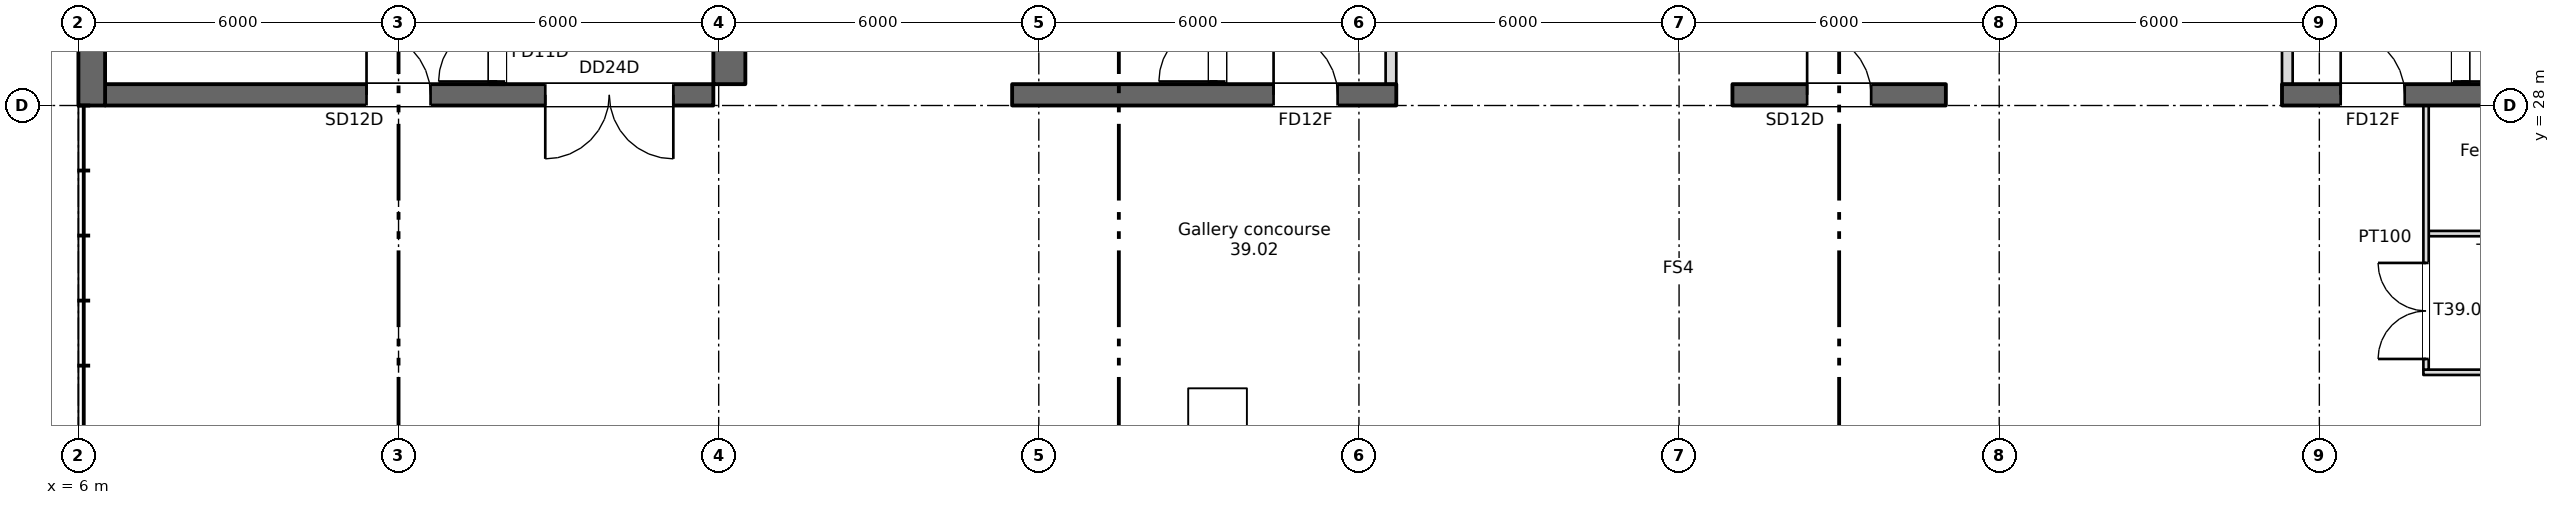
"""IFC4 building model, lengths in metres.
Left out: names, types, materials, properties, quantities, classifications, styles, units other than length and angle.
Written with IfcOpenShell. Run it as: python <this file> out.ifc"""

import sys

from ifc_helpers import new_model, si_unit, direction, frame, frame_2d, origin, place, context, subcontext, project, spatial, rectangle, extrude, element, fill, save


model = new_model("IFC4")
c1 = context("Model", 3, precision=1e-05, world=origin(), true_north=direction((0.0, 1.0)))
c2 = subcontext(c1, "Body", "Model", "MODEL_VIEW")
j1 = project(units=[si_unit("LENGTHUNIT", "METRE"), si_unit("PLANEANGLEUNIT", "RADIAN")], contexts=[c1])
p1 = place(None, origin())
s1 = spatial("IfcSite", under=j1, at=p1, CompositionType="ELEMENT")
p2 = place(p1, origin())
s2 = spatial("IfcBuilding", under=s1, at=p2, CompositionType="ELEMENT")
p3 = place(p2, frame((0.0, 0.0, 265.95)))
s3 = spatial("IfcBuildingStorey", under=s2, at=p3, CompositionType="ELEMENT", Elevation=265.95)
p4 = place(p3, frame((6.25, 28.0, 0.0), z_axis=(0.0, 0.0, 1.0), x_axis=(0.0, 1.0, 0.0)))
e1 = element("IfcWall", 1, at=p4, inside=s3, PredefinedType="SHEAR", context=c2, shape_type="SweptSolid", body=[
    extrude(rectangle(XDim=13.5, YDim=0.5, at=frame_2d((6.75, 0.0))), origin(), (0.0, 0.0, 1.0), 5.4),
])
p5 = place(p3, frame((10.15, 28.4, 0.0), z_axis=(0.0, 0.0, 1.0), x_axis=(0.0, 1.0, 0.0)))
e2 = element("IfcWall", 2, at=p5, inside=s3, PredefinedType="SHEAR", context=c2, shape_type="SweptSolid", body=[
    extrude(rectangle(XDim=6.1, YDim=0.3, at=frame_2d((3.05, 0.0))), origin(), (0.0, 0.0, 1.0), 5.4),
])
p6 = place(p3, frame((13.85, 28.4, 0.0), z_axis=(0.0, 0.0, 1.0), x_axis=(0.0, 1.0, 0.0)))
e3 = element("IfcWall", 3, at=p6, inside=s3, PredefinedType="SHEAR", context=c2, shape_type="SweptSolid", body=[
    extrude(rectangle(XDim=6.1, YDim=0.3, at=frame_2d((3.05, 0.0))), origin(), (0.0, 0.0, 1.0), 5.4),
])
p7 = place(p6, frame((0.05, 0.0, 0.0)))
e4 = element("IfcOpeningElement", 4, at=p7, cuts=e3, PredefinedType="OPENING", context=c2, shape_type="SweptSolid", body=[
    extrude(rectangle(XDim=1.1, YDim=2.1, at=frame_2d((0.55, 1.05))), frame((0.0, 0.16, 0.0), z_axis=(0.0, -1.0, 0.0), x_axis=(1.0, 0.0, 0.0)), (0.0, 0.0, 1.0), 0.32),
])
p8 = place(p3, frame((23.65, 28.4, 0.0), z_axis=(0.0, 0.0, 1.0), x_axis=(0.0, 1.0, 0.0)))
e5 = element("IfcWall", 5, at=p8, inside=s3, PredefinedType="SHEAR", context=c2, shape_type="SweptSolid", body=[
    extrude(rectangle(XDim=6.1, YDim=0.3, at=frame_2d((3.05, 0.0))), origin(), (0.0, 0.0, 1.0), 5.4),
])
p9 = place(p3, frame((27.35, 28.4, 0.0), z_axis=(0.0, 0.0, 1.0), x_axis=(0.0, 1.0, 0.0)))
e6 = element("IfcWall", 6, at=p9, inside=s3, PredefinedType="SHEAR", context=c2, shape_type="SweptSolid", body=[
    extrude(rectangle(XDim=6.1, YDim=0.3, at=frame_2d((3.05, 0.0))), origin(), (0.0, 0.0, 1.0), 5.4),
])
p10 = place(p9, frame((0.05, 0.0, 0.0)))
e7 = element("IfcOpeningElement", 7, at=p10, cuts=e6, PredefinedType="OPENING", context=c2, shape_type="SweptSolid", body=[
    extrude(rectangle(XDim=1.1, YDim=2.1, at=frame_2d((0.55, 1.05))), frame((0.0, 0.16, 0.0), z_axis=(0.0, -1.0, 0.0), x_axis=(1.0, 0.0, 0.0)), (0.0, 0.0, 1.0), 0.32),
])
p11 = place(p3, frame((23.5, 28.2, 0.0), z_axis=(0.0, 0.0, 1.0), x_axis=(1.0, 0.0, 0.0)))
e8 = element("IfcWall", 8, at=p11, inside=s3, PredefinedType="SHEAR", context=c2, shape_type="SweptSolid", body=[
    extrude(rectangle(XDim=7.2, YDim=0.4, at=frame_2d((3.6, 0.0))), origin(), (0.0, 0.0, 1.0), 5.4),
])
p12 = place(p11, frame((4.9, 0.0, 0.0)))
e9 = element("IfcOpeningElement", 9, at=p12, cuts=e8, PredefinedType="OPENING", context=c2, shape_type="SweptSolid", body=[
    extrude(rectangle(XDim=1.2, YDim=2.1, at=frame_2d((0.6, 1.05))), frame((0.0, 0.21, 0.0), z_axis=(0.0, -1.0, 0.0), x_axis=(1.0, 0.0, 0.0)), (0.0, 0.0, 1.0), 0.42),
])
for number, where, z_axis, x_axis in (
    (10, (37.15, 28.4, 0.0), (0.0, 0.0, 1.0), (0.0, 1.0, 0.0)),
    (11, (40.85, 28.4, 0.0), (0.0, 0.0, 1.0), (0.0, 1.0, 0.0)),
):
    element("IfcWall", number, at=place(p3, frame(where, z_axis=z_axis, x_axis=x_axis)), inside=s3, PredefinedType="SHEAR", context=c2, shape_type="SweptSolid", body=[
        extrude(rectangle(XDim=6.1, YDim=0.3, at=frame_2d((3.05, 0.0))), origin(), (0.0, 0.0, 1.0), 5.4),
    ])
p13 = place(p3, frame((37.0, 28.2, 0.0), z_axis=(0.0, 0.0, 1.0), x_axis=(1.0, 0.0, 0.0)))
e12 = element("IfcWall", 12, at=p13, inside=s3, PredefinedType="SHEAR", context=c2, shape_type="SweptSolid", body=[
    extrude(rectangle(XDim=4.0, YDim=0.4, at=frame_2d((2.0, 0.0))), origin(), (0.0, 0.0, 1.0), 5.4),
])
p14 = place(p13, frame((1.4, 0.0, 0.0)))
e13 = element("IfcOpeningElement", 13, at=p14, cuts=e12, PredefinedType="OPENING", context=c2, shape_type="SweptSolid", body=[
    extrude(rectangle(XDim=1.2, YDim=2.1, at=frame_2d((0.6, 1.05))), frame((0.0, 0.21, 0.0), z_axis=(0.0, -1.0, 0.0), x_axis=(1.0, 0.0, 0.0)), (0.0, 0.0, 1.0), 0.42),
])
p15 = place(p3, frame((50.65, 34.5, 0.0), z_axis=(0.0, 0.0, 1.0), x_axis=(0.0, -1.0, 0.0)))
e14 = element("IfcWall", 14, at=p15, inside=s3, PredefinedType="SHEAR", context=c2, shape_type="SweptSolid", body=[
    extrude(rectangle(XDim=6.1, YDim=0.3, at=frame_2d((3.05, 0.0))), origin(), (0.0, 0.0, 1.0), 5.4),
])
p16 = place(p15, frame((4.95, 0.0, 0.0)))
e15 = element("IfcOpeningElement", 15, at=p16, cuts=e14, PredefinedType="OPENING", context=c2, shape_type="SweptSolid", body=[
    extrude(rectangle(XDim=1.1, YDim=2.1, at=frame_2d((0.55, 1.05))), frame((0.0, 0.16, 0.0), z_axis=(0.0, -1.0, 0.0), x_axis=(1.0, 0.0, 0.0)), (0.0, 0.0, 1.0), 0.32),
])
p17 = place(p3, frame((47.3, 28.2, 0.0), z_axis=(0.0, 0.0, 1.0), x_axis=(1.0, 0.0, 0.0)))
e16 = element("IfcWall", 16, at=p17, inside=s3, PredefinedType="SHEAR", context=c2, shape_type="SweptSolid", body=[
    extrude(rectangle(XDim=7.2, YDim=0.4, at=frame_2d((3.6, 0.0))), origin(), (0.0, 0.0, 1.0), 5.4),
])
p18 = place(p17, frame((1.1, 0.0, 0.0)))
e17 = element("IfcOpeningElement", 17, at=p18, cuts=e16, PredefinedType="OPENING", context=c2, shape_type="SweptSolid", body=[
    extrude(rectangle(XDim=1.2, YDim=2.1, at=frame_2d((0.6, 1.05))), frame((0.0, 0.21, 0.0), z_axis=(0.0, -1.0, 0.0), x_axis=(1.0, 0.0, 0.0)), (0.0, 0.0, 1.0), 0.42),
])
for number, where, z_axis, x_axis in (
    (18, (30.6, 28.4, 0.0), (0.0, 0.0, 1.0), (0.0, 1.0, 0.0)),
    (19, (47.4, 28.4, 0.0), (0.0, 0.0, 1.0), (0.0, 1.0, 0.0)),
):
    element("IfcWall", number, at=place(p3, frame(where, z_axis=z_axis, x_axis=x_axis)), inside=s3, PredefinedType="PARTITIONING", context=c2, shape_type="SweptSolid", body=[
        extrude(rectangle(XDim=6.1, YDim=0.2, at=frame_2d((3.05, 0.0))), origin(), (0.0, 0.0, 1.0), 5.4),
    ])
p19 = place(p3, frame((6.5, 28.2, 0.0), z_axis=(0.0, 0.0, 1.0), x_axis=(1.0, 0.0, 0.0)))
e20 = element("IfcWall", 20, at=p19, inside=s3, PredefinedType="SHEAR", context=c2, shape_type="SweptSolid", body=[
    extrude(rectangle(XDim=11.4, YDim=0.4, at=frame_2d((5.7, 0.0))), origin(), (0.0, 0.0, 1.0), 5.4),
])
p20 = place(p19, frame((4.9, 0.0, 0.0)))
e21 = element("IfcOpeningElement", 21, at=p20, cuts=e20, PredefinedType="OPENING", context=c2, shape_type="SweptSolid", body=[
    extrude(rectangle(XDim=1.2, YDim=2.1, at=frame_2d((0.6, 1.05))), frame((0.0, 0.21, 0.0), z_axis=(0.0, -1.0, 0.0), x_axis=(1.0, 0.0, 0.0)), (0.0, 0.0, 1.0), 0.42),
])
p21 = place(p19, frame((8.25, 0.0, 0.0)))
e22 = element("IfcOpeningElement", 22, at=p21, cuts=e20, PredefinedType="OPENING", context=c2, shape_type="SweptSolid", body=[
    extrude(rectangle(XDim=2.4, YDim=2.1, at=frame_2d((1.2, 1.05))), frame((0.0, 0.21, 0.0), z_axis=(0.0, -1.0, 0.0), x_axis=(1.0, 0.0, 0.0)), (0.0, 0.0, 1.0), 0.42),
])
p22 = place(p3, frame((6.75, 28.4, 0.0), z_axis=(0.0, 0.0, 1.0), x_axis=(0.0, 1.0, 0.0)))
e23 = element("IfcWall", 23, at=p22, inside=s3, PredefinedType="SHEAR", context=c2, shape_type="SweptSolid", body=[
    extrude(rectangle(XDim=12.3, YDim=0.5, at=frame_2d((6.15, 0.0))), origin(), (0.0, 0.0, 1.0), 5.4),
])
p23 = place(p3, frame((18.2, 40.7, 0.0), z_axis=(0.0, 0.0, 1.0), x_axis=(0.0, -1.0, 0.0)))
e24 = element("IfcWall", 24, at=p23, inside=s3, PredefinedType="SHEAR", context=c2, shape_type="SweptSolid", body=[
    extrude(rectangle(XDim=12.3, YDim=0.6, at=frame_2d((6.15, 0.0))), origin(), (0.0, 0.0, 1.0), 5.4),
])
p24 = place(p23, frame((0.7, 0.0, 0.0)))
e25 = element("IfcOpeningElement", 25, at=p24, cuts=e24, PredefinedType="OPENING", context=c2, shape_type="SweptSolid", body=[
    extrude(rectangle(XDim=2.0, YDim=2.1, at=frame_2d((1.0, 1.05))), frame((0.0, 0.31, 0.0), z_axis=(0.0, -1.0, 0.0), x_axis=(1.0, 0.0, 0.0)), (0.0, 0.0, 1.0), 0.62),
])
p25 = place(p3, frame((49.95, 23.0, 0.0), z_axis=(0.0, 0.0, 1.0), x_axis=(1.0, 0.0, 0.0)))
e26 = element("IfcWall", 26, at=p25, inside=s3, PredefinedType="PARTITIONING", context=c2, shape_type="SweptSolid", body=[
    extrude(rectangle(XDim=8.75, YDim=0.1, at=frame_2d((4.375, 0.0))), origin(), (0.0, 0.0, 1.0), 5.4),
])
p26 = place(p3, frame((50.05, 25.6, 0.0), z_axis=(0.0, 0.0, 1.0), x_axis=(1.0, 0.0, 0.0)))
e27 = element("IfcWall", 27, at=p26, inside=s3, PredefinedType="PARTITIONING", context=c2, shape_type="SweptSolid", body=[
    extrude(rectangle(XDim=10.7, YDim=0.1, at=frame_2d((5.35, 0.0))), origin(), (0.0, 0.0, 1.0), 5.4),
])
p27 = place(p26, frame((1.05, 0.0, 0.0)))
e28 = element("IfcOpeningElement", 28, at=p27, cuts=e27, PredefinedType="OPENING", context=c2, shape_type="SweptSolid", body=[
    extrude(rectangle(XDim=1.0, YDim=2.1, at=frame_2d((0.5, 1.05))), frame((0.0, 0.06, 0.0), z_axis=(0.0, -1.0, 0.0), x_axis=(1.0, 0.0, 0.0)), (0.0, 0.0, 1.0), 0.12),
])
p28 = place(p26, frame((4.25, 0.0, 0.0)))
e29 = element("IfcOpeningElement", 29, at=p28, cuts=e27, PredefinedType="OPENING", context=c2, shape_type="SweptSolid", body=[
    extrude(rectangle(XDim=1.0, YDim=2.1, at=frame_2d((0.5, 1.05))), frame((0.0, 0.06, 0.0), z_axis=(0.0, -1.0, 0.0), x_axis=(1.0, 0.0, 0.0)), (0.0, 0.0, 1.0), 0.12),
])
p29 = place(p26, frame((6.95, 0.0, 0.0)))
e30 = element("IfcOpeningElement", 30, at=p29, cuts=e27, PredefinedType="OPENING", context=c2, shape_type="SweptSolid", body=[
    extrude(rectangle(XDim=1.0, YDim=2.1, at=frame_2d((0.5, 1.05))), frame((0.0, 0.06, 0.0), z_axis=(0.0, -1.0, 0.0), x_axis=(1.0, 0.0, 0.0)), (0.0, 0.0, 1.0), 0.12),
])
p30 = place(p3, frame((50.0, 23.05, 0.0), z_axis=(0.0, 0.0, 1.0), x_axis=(0.0, 1.0, 0.0)))
e31 = element("IfcWall", 31, at=p30, inside=s3, PredefinedType="PARTITIONING", context=c2, shape_type="SweptSolid", body=[
    extrude(rectangle(XDim=4.95, YDim=0.1, at=frame_2d((2.475, 0.0))), origin(), (0.0, 0.0, 1.0), 5.4),
])
p31 = place(p30, frame((0.2, 0.0, 0.0)))
e32 = element("IfcOpeningElement", 32, at=p31, cuts=e31, PredefinedType="OPENING", context=c2, shape_type="SweptSolid", body=[
    extrude(rectangle(XDim=1.8, YDim=2.1, at=frame_2d((0.9, 1.05))), frame((0.0, 0.06, 0.0), z_axis=(0.0, -1.0, 0.0), x_axis=(1.0, 0.0, 0.0)), (0.0, 0.0, 1.0), 0.12),
])
p32 = place(p20, origin())
e33 = element("IfcDoor", 33, at=p32, inside=s3, OperationType="SINGLE_SWING_LEFT", PredefinedType="DOOR", context=c2, shape_type="SweptSolid", body=[
    extrude(rectangle(XDim=1.2, YDim=2.1, at=frame_2d((0.6, 1.05))), frame((0.0, 0.025, 0.0), z_axis=(0.0, -1.0, 0.0), x_axis=(1.0, 0.0, 0.0)), (0.0, 0.0, 1.0), 0.05),
])
fill(e21, e33)
p33 = place(p10, origin())
e34 = element("IfcDoor", 34, at=p33, inside=s3, OperationType="SINGLE_SWING_LEFT", PredefinedType="DOOR", context=c2, shape_type="SweptSolid", body=[
    extrude(rectangle(XDim=1.1, YDim=2.1, at=frame_2d((0.55, 1.05))), frame((0.0, 0.025, 0.0), z_axis=(0.0, -1.0, 0.0), x_axis=(1.0, 0.0, 0.0)), (0.0, 0.0, 1.0), 0.05),
])
fill(e7, e34)
p34 = place(p14, origin())
e35 = element("IfcDoor", 35, at=p34, inside=s3, OperationType="SINGLE_SWING_LEFT", PredefinedType="DOOR", context=c2, shape_type="SweptSolid", body=[
    extrude(rectangle(XDim=1.2, YDim=2.1, at=frame_2d((0.6, 1.05))), frame((0.0, 0.025, 0.0), z_axis=(0.0, -1.0, 0.0), x_axis=(1.0, 0.0, 0.0)), (0.0, 0.0, 1.0), 0.05),
])
fill(e13, e35)
p35 = place(p16, origin())
e36 = element("IfcDoor", 36, at=p35, inside=s3, OperationType="SINGLE_SWING_RIGHT", PredefinedType="DOOR", context=c2, shape_type="SweptSolid", body=[
    extrude(rectangle(XDim=1.1, YDim=2.1, at=frame_2d((0.55, 1.05))), frame((0.0, 0.025, 0.0), z_axis=(0.0, -1.0, 0.0), x_axis=(1.0, 0.0, 0.0)), (0.0, 0.0, 1.0), 0.05),
])
fill(e15, e36)
p36 = place(p12, origin())
e37 = element("IfcDoor", 37, at=p36, inside=s3, OperationType="SINGLE_SWING_LEFT", PredefinedType="DOOR", context=c2, shape_type="SweptSolid", body=[
    extrude(rectangle(XDim=1.2, YDim=2.1, at=frame_2d((0.6, 1.05))), frame((0.0, 0.025, 0.0), z_axis=(0.0, -1.0, 0.0), x_axis=(1.0, 0.0, 0.0)), (0.0, 0.0, 1.0), 0.05),
])
fill(e9, e37)
p37 = place(p18, origin())
e38 = element("IfcDoor", 38, at=p37, inside=s3, OperationType="SINGLE_SWING_LEFT", PredefinedType="DOOR", context=c2, shape_type="SweptSolid", body=[
    extrude(rectangle(XDim=1.2, YDim=2.1, at=frame_2d((0.6, 1.05))), frame((0.0, 0.025, 0.0), z_axis=(0.0, -1.0, 0.0), x_axis=(1.0, 0.0, 0.0)), (0.0, 0.0, 1.0), 0.05),
])
fill(e17, e38)
p38 = place(p21, origin())
e39 = element("IfcDoor", 39, at=p38, inside=s3, OperationType="DOUBLE_DOOR_SINGLE_SWING", PredefinedType="DOOR", context=c2, shape_type="SweptSolid", body=[
    extrude(rectangle(XDim=2.4, YDim=2.1, at=frame_2d((1.2, 1.05))), frame((0.0, 0.025, 0.0), z_axis=(0.0, -1.0, 0.0), x_axis=(1.0, 0.0, 0.0)), (0.0, 0.0, 1.0), 0.05),
])
fill(e22, e39)
p39 = place(p7, origin())
e40 = element("IfcDoor", 40, at=p39, inside=s3, OperationType="SINGLE_SWING_LEFT", PredefinedType="DOOR", context=c2, shape_type="SweptSolid", body=[
    extrude(rectangle(XDim=1.1, YDim=2.1, at=frame_2d((0.55, 1.05))), frame((0.0, 0.025, 0.0), z_axis=(0.0, -1.0, 0.0), x_axis=(1.0, 0.0, 0.0)), (0.0, 0.0, 1.0), 0.05),
])
fill(e4, e40)
p40 = place(p31, origin())
e41 = element("IfcDoor", 41, at=p40, inside=s3, OperationType="DOUBLE_DOOR_SINGLE_SWING", PredefinedType="DOOR", context=c2, shape_type="SweptSolid", body=[
    extrude(rectangle(XDim=1.8, YDim=2.1, at=frame_2d((0.9, 1.05))), frame((0.0, 0.025, 0.0), z_axis=(0.0, -1.0, 0.0), x_axis=(1.0, 0.0, 0.0)), (0.0, 0.0, 1.0), 0.05),
])
fill(e32, e41)
save(model, sys.argv[1])
